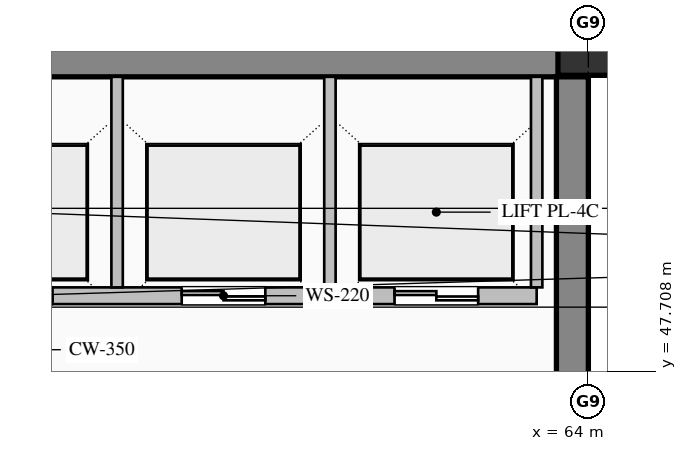
"""IFC4 building model, lengths in metres.
Left out: names, types, materials, properties, quantities, classifications, styles, units other than length and angle.
Written with IfcOpenShell. Run it as: python <this file> out.ifc"""

import sys

from ifc_helpers import new_model, si_unit, direction, frame, frame_2d, origin, origin_2d, place, context, subcontext, project, spatial, rectangle, hollow_rectangle, extrude, element, fill, save


model = new_model("IFC4")
c1 = context("Model", 3, precision=1e-05, world=origin(), true_north=direction((0.0, 1.0)))
c2 = subcontext(c1, "Body", "Model", "MODEL_VIEW")
j1 = project(units=[si_unit("LENGTHUNIT", "METRE"), si_unit("PLANEANGLEUNIT", "RADIAN")], contexts=[c1])
p1 = place(None, origin())
s1 = spatial("IfcSite", under=j1, at=p1, CompositionType="ELEMENT")
p2 = place(p1, origin())
s2 = spatial("IfcBuilding", under=s1, at=p2, CompositionType="ELEMENT")
p3 = place(p2, frame((0.0, 0.0, 299.2)))
s3 = spatial("IfcBuildingStorey", under=s2, at=p3, CompositionType="ELEMENT", Elevation=299.2)
p4 = place(p3, frame((40.5, 51.79, 0.0), z_axis=(0.0, 0.0, 1.0), x_axis=(1.0, 0.0, 0.0)))
e1 = element("IfcWall", 1, at=p4, inside=s3, PredefinedType="SHEAR", context=c2, shape_type="SweptSolid", body=[
    extrude(rectangle(XDim=23.5, YDim=0.42, at=frame_2d((11.75, 0.0))), origin(), (0.0, 0.0, 1.0), 3.785),
])
p5 = place(p3, frame((63.79, 36.32, 0.0), z_axis=(0.0, 0.0, 1.0), x_axis=(0.0, 1.0, 0.0)))
e2 = element("IfcWall", 2, at=p5, inside=s3, PredefinedType="SHEAR", context=c2, shape_type="SweptSolid", body=[
    extrude(rectangle(XDim=15.26, YDim=0.42, at=frame_2d((7.63, 0.0))), origin(), (0.0, 0.0, 1.0), 3.785),
])
p6 = place(p3, frame((64.0, 52.0, 0.0), z_axis=(0.0, 0.0, 1.0), x_axis=(1.0, 0.0, 0.0)))
e3 = element("IfcColumn", 3, at=p6, inside=s3, PredefinedType="COLUMN", context=c2, shape_type="SweptSolid", body=[
    extrude(hollow_rectangle(XDim=0.8, YDim=0.8, WallThickness=0.032, at=origin_2d()), origin(), (0.0, 0.0, 1.0), 4.0),
])
p7 = place(p3, frame((63.32, 48.7, 0.0), z_axis=(0.0, 0.0, 1.0), x_axis=(-1.0, 0.0, 0.0)))
e4 = element("IfcWall", 4, at=p7, inside=s3, PredefinedType="PARTITIONING", context=c2, shape_type="SweptSolid", body=[
    extrude(rectangle(XDim=8.24, YDim=0.22, at=frame_2d((4.12, 0.0))), origin(), (0.0, 0.0, 1.0), 3.785),
])
p8 = place(p7, frame((6.37, 0.0, 0.0)))
e5 = element("IfcOpeningElement", 5, at=p8, cuts=e4, PredefinedType="OPENING", context=c2, shape_type="SweptSolid", body=[
    extrude(rectangle(XDim=1.1, YDim=2.2, at=frame_2d((0.55, 1.1))), frame((0.0, 0.12, 0.0), z_axis=(0.0, -1.0, 0.0), x_axis=(1.0, 0.0, 0.0)), (0.0, 0.0, 1.0), 0.24),
])
p9 = place(p7, frame((3.57, 0.0, 0.0)))
e6 = element("IfcOpeningElement", 6, at=p9, cuts=e4, PredefinedType="OPENING", context=c2, shape_type="SweptSolid", body=[
    extrude(rectangle(XDim=1.1, YDim=2.2, at=frame_2d((0.55, 1.1))), frame((0.0, 0.12, 0.0), z_axis=(0.0, -1.0, 0.0), x_axis=(1.0, 0.0, 0.0)), (0.0, 0.0, 1.0), 0.24),
])
p10 = place(p7, frame((0.77, 0.0, 0.0)))
e7 = element("IfcOpeningElement", 7, at=p10, cuts=e4, PredefinedType="OPENING", context=c2, shape_type="SweptSolid", body=[
    extrude(rectangle(XDim=1.1, YDim=2.2, at=frame_2d((0.55, 1.1))), frame((0.0, 0.12, 0.0), z_axis=(0.0, -1.0, 0.0), x_axis=(1.0, 0.0, 0.0)), (0.0, 0.0, 1.0), 0.24),
])
for number, where, z_axis, x_axis in (
    (8, (57.8, 48.81, 0.0), (0.0, 0.0, 1.0), (0.0, 1.0, 0.0)),
    (9, (60.6, 48.81, 0.0), (0.0, 0.0, 1.0), (0.0, 1.0, 0.0)),
    (10, (63.32, 48.81, 0.0), (0.0, 0.0, 1.0), (0.0, 1.0, 0.0)),
):
    element("IfcWall", number, at=place(p3, frame(where, z_axis=z_axis, x_axis=x_axis)), inside=s3, PredefinedType="PARTITIONING", context=c2, shape_type="SweptSolid", body=[
        extrude(rectangle(XDim=2.77, YDim=0.15, at=frame_2d((1.385, 0.0))), origin(), (0.0, 0.0, 1.0), 3.785),
    ])
p11 = place(p9, origin())
e11 = element("IfcDoor", 11, at=p11, inside=s3, OperationType="DOUBLE_DOOR_SLIDING", PredefinedType="DOOR", context=c2, shape_type="SweptSolid", body=[
    extrude(rectangle(XDim=1.1, YDim=2.2, at=frame_2d((0.55, 1.1))), frame((0.0, 0.025, 0.0), z_axis=(0.0, -1.0, 0.0), x_axis=(1.0, 0.0, 0.0)), (0.0, 0.0, 1.0), 0.05),
])
fill(e6, e11)
p12 = place(p10, origin())
e12 = element("IfcDoor", 12, at=p12, inside=s3, OperationType="DOUBLE_DOOR_SLIDING", PredefinedType="DOOR", context=c2, shape_type="SweptSolid", body=[
    extrude(rectangle(XDim=1.1, YDim=2.2, at=frame_2d((0.55, 1.1))), frame((0.0, 0.025, 0.0), z_axis=(0.0, -1.0, 0.0), x_axis=(1.0, 0.0, 0.0)), (0.0, 0.0, 1.0), 0.05),
])
fill(e7, e12)
save(model, sys.argv[1])
